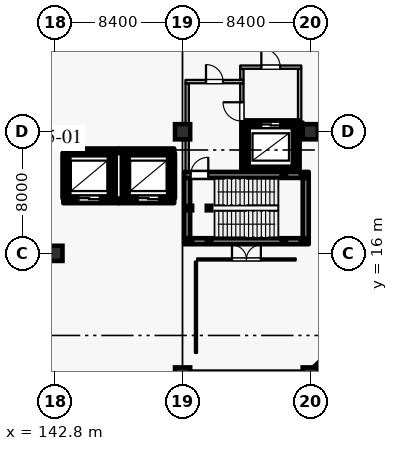
"""IFC4 building model, lengths in metres.
Left out: names, types, materials, properties, quantities, classifications, styles, units other than length and angle.
Written with IfcOpenShell. Run it as: python <this file> out.ifc"""

import sys

from ifc_helpers import new_model, si_unit, direction, frame, frame_2d, origin, origin_2d, place, context, subcontext, project, spatial, rectangle, hollow_rectangle, extrude, element, fill, save


model = new_model("IFC4")
c1 = context("Model", 3, precision=1e-05, world=origin(), true_north=direction((0.0, 1.0)))
c2 = subcontext(c1, "Body", "Model", "MODEL_VIEW")
j1 = project(units=[si_unit("LENGTHUNIT", "METRE"), si_unit("PLANEANGLEUNIT", "RADIAN")], contexts=[c1])
p1 = place(None, origin())
s1 = spatial("IfcSite", under=j1, at=p1, CompositionType="ELEMENT")
p2 = place(p1, origin())
s2 = spatial("IfcBuilding", under=s1, at=p2, CompositionType="ELEMENT")
p3 = place(p2, frame((0.0, 0.0, -5.4)))
s3 = spatial("IfcBuildingStorey", under=s2, at=p3, CompositionType="ELEMENT", Elevation=-5.4)
for number, where, z_axis, x_axis in (
    (1, (142.8, 16.0, 0.0), (0.0, 0.0, 1.0), (1.0, 0.0, 0.0)),
    (2, (151.2, 8.0, 0.0), (0.0, 0.0, 1.0), (1.0, 0.0, 0.0)),
    (3, (151.2, 24.0, 0.0), (0.0, 0.0, 1.0), (1.0, 0.0, 0.0)),
    (4, (159.6, 8.0, 0.0), (0.0, 0.0, 1.0), (1.0, 0.0, 0.0)),
    (5, (159.6, 24.0, 0.0), (0.0, 0.0, 1.0), (1.0, 0.0, 0.0)),
):
    element("IfcColumn", number, at=place(p3, frame(where, z_axis=z_axis, x_axis=x_axis)), inside=s3, PredefinedType="COLUMN", context=c2, shape_type="SweptSolid", body=[
        extrude(rectangle(XDim=1.0, YDim=1.0, at=origin_2d()), origin(), (0.0, 0.0, 1.0), 5.4),
    ])
p4 = place(p3, frame((155.15, 21.4, -1.4), z_axis=(0.0, 0.0, 1.0), x_axis=(1.0, 0.0, 0.0)))
e6 = element("IfcWall", 6, at=p4, inside=s3, PredefinedType="USERDEFINED", context=c2, shape_type="SweptSolid", body=[
    extrude(rectangle(XDim=3.7, YDim=0.3, at=frame_2d((1.85, 0.0))), origin(), (0.0, 0.0, 1.0), 1.4),
])
p5 = place(p3, frame((158.75, 21.56, -1.4), z_axis=(0.0, 0.0, 1.0), x_axis=(0.0, 1.0, 0.0)))
e7 = element("IfcWall", 7, at=p5, inside=s3, PredefinedType="USERDEFINED", context=c2, shape_type="SweptSolid", body=[
    extrude(rectangle(XDim=2.88, YDim=0.3, at=frame_2d((1.44, 0.0))), origin(), (0.0, 0.0, 1.0), 1.4),
])
p6 = place(p3, frame((158.85, 24.6, -1.4), z_axis=(0.0, 0.0, 1.0), x_axis=(-1.0, 0.0, 0.0)))
e8 = element("IfcWall", 8, at=p6, inside=s3, PredefinedType="USERDEFINED", context=c2, shape_type="SweptSolid", body=[
    extrude(rectangle(XDim=3.7, YDim=0.3, at=frame_2d((1.85, 0.0))), origin(), (0.0, 0.0, 1.0), 1.4),
])
p7 = place(p3, frame((155.25, 24.44, -1.4), z_axis=(0.0, 0.0, 1.0), x_axis=(0.0, -1.0, 0.0)))
e9 = element("IfcWall", 9, at=p7, inside=s3, PredefinedType="USERDEFINED", context=c2, shape_type="SweptSolid", body=[
    extrude(rectangle(XDim=2.88, YDim=0.3, at=frame_2d((1.44, 0.0))), origin(), (0.0, 0.0, 1.0), 1.4),
])
p8 = place(p3, frame((143.35, 19.45, -1.4), z_axis=(0.0, 0.0, 1.0), x_axis=(1.0, 0.0, 0.0)))
e10 = element("IfcWall", 10, at=p8, inside=s3, PredefinedType="USERDEFINED", context=c2, shape_type="SweptSolid", body=[
    extrude(rectangle(XDim=3.65, YDim=0.3, at=frame_2d((1.825, 0.0))), origin(), (0.0, 0.0, 1.0), 1.4),
])
p9 = place(p3, frame((146.65, 19.61, -1.4), z_axis=(0.0, 0.0, 1.0), x_axis=(0.0, 1.0, 0.0)))
e11 = element("IfcWall", 11, at=p9, inside=s3, PredefinedType="USERDEFINED", context=c2, shape_type="SweptSolid", body=[
    extrude(rectangle(XDim=2.98, YDim=0.3, at=frame_2d((1.49, 0.0))), origin(), (0.0, 0.0, 1.0), 1.4),
])
p10 = place(p3, frame((147.0, 22.75, -1.4), z_axis=(0.0, 0.0, 1.0), x_axis=(-1.0, 0.0, 0.0)))
e12 = element("IfcWall", 12, at=p10, inside=s3, PredefinedType="USERDEFINED", context=c2, shape_type="SweptSolid", body=[
    extrude(rectangle(XDim=3.65, YDim=0.3, at=frame_2d((1.825, 0.0))), origin(), (0.0, 0.0, 1.0), 1.4),
])
p11 = place(p3, frame((143.45, 22.59, -1.4), z_axis=(0.0, 0.0, 1.0), x_axis=(0.0, -1.0, 0.0)))
e13 = element("IfcWall", 13, at=p11, inside=s3, PredefinedType="USERDEFINED", context=c2, shape_type="SweptSolid", body=[
    extrude(rectangle(XDim=2.98, YDim=0.3, at=frame_2d((1.49, 0.0))), origin(), (0.0, 0.0, 1.0), 1.4),
])
p12 = place(p3, frame((147.0, 19.45, -1.4), z_axis=(0.0, 0.0, 1.0), x_axis=(1.0, 0.0, 0.0)))
e14 = element("IfcWall", 14, at=p12, inside=s3, PredefinedType="USERDEFINED", context=c2, shape_type="SweptSolid", body=[
    extrude(rectangle(XDim=3.65, YDim=0.3, at=frame_2d((1.825, 0.0))), origin(), (0.0, 0.0, 1.0), 1.4),
])
p13 = place(p3, frame((150.55, 19.61, -1.4), z_axis=(0.0, 0.0, 1.0), x_axis=(0.0, 1.0, 0.0)))
e15 = element("IfcWall", 15, at=p13, inside=s3, PredefinedType="USERDEFINED", context=c2, shape_type="SweptSolid", body=[
    extrude(rectangle(XDim=2.98, YDim=0.3, at=frame_2d((1.49, 0.0))), origin(), (0.0, 0.0, 1.0), 1.4),
])
p14 = place(p3, frame((150.65, 22.75, -1.4), z_axis=(0.0, 0.0, 1.0), x_axis=(-1.0, 0.0, 0.0)))
e16 = element("IfcWall", 16, at=p14, inside=s3, PredefinedType="USERDEFINED", context=c2, shape_type="SweptSolid", body=[
    extrude(rectangle(XDim=3.65, YDim=0.3, at=frame_2d((1.825, 0.0))), origin(), (0.0, 0.0, 1.0), 1.4),
])
p15 = place(p3, frame((147.35, 22.59, -1.4), z_axis=(0.0, 0.0, 1.0), x_axis=(0.0, -1.0, 0.0)))
e17 = element("IfcWall", 17, at=p15, inside=s3, PredefinedType="USERDEFINED", context=c2, shape_type="SweptSolid", body=[
    extrude(rectangle(XDim=2.98, YDim=0.3, at=frame_2d((1.49, 0.0))), origin(), (0.0, 0.0, 1.0), 1.4),
])
p16 = place(p3, frame((159.1, 8.0, 0.0), z_axis=(0.0, 0.0, 1.0), x_axis=(-1.0, 0.0, 0.0)))
e18 = element("IfcWall", 18, at=p16, inside=s3, PredefinedType="USERDEFINED", context=c2, shape_type="SweptSolid", body=[
    extrude(rectangle(XDim=7.4, YDim=0.45, at=frame_2d((3.7, 0.0))), origin(), (0.0, 0.0, 1.0), 4.3),
])
p17 = place(p3, frame((167.638, 15.655, 0.0), z_axis=(0.0, 0.0, 1.0), x_axis=(-0.72415874468, -0.689633317426, 0.0)))
e19 = element("IfcWall", 19, at=p17, inside=s3, PredefinedType="USERDEFINED", context=c2, shape_type="SweptSolid", body=[
    extrude(rectangle(XDim=10.6, YDim=0.45, at=frame_2d((5.3, 0.0))), origin(), (0.0, 0.0, 1.0), 4.3),
])
p18 = place(p3, frame((155.25, 21.55, 0.0), z_axis=(0.0, 0.0, 1.0), x_axis=(1.0, 0.0, 0.0)))
e20 = element("IfcWall", 20, at=p18, inside=s3, PredefinedType="SHEAR", context=c2, shape_type="SweptSolid", body=[
    extrude(rectangle(XDim=3.5, YDim=0.3, at=frame_2d((1.75, 0.0))), origin(), (0.0, 0.0, 1.0), 4.995),
])
p19 = place(p3, frame((158.6, 21.705, 0.0), z_axis=(0.0, 0.0, 1.0), x_axis=(0.0, 1.0, 0.0)))
e21 = element("IfcWall", 21, at=p19, inside=s3, PredefinedType="SHEAR", context=c2, shape_type="SweptSolid", body=[
    extrude(rectangle(XDim=2.59, YDim=0.3, at=frame_2d((1.295, 0.0))), origin(), (0.0, 0.0, 1.0), 4.995),
])
p20 = place(p3, frame((159.11, 24.45, 0.0), z_axis=(0.0, 0.0, 1.0), x_axis=(-1.0, 0.0, 0.0)))
e22 = element("IfcWall", 22, at=p20, inside=s3, PredefinedType="SHEAR", context=c2, shape_type="SweptSolid", body=[
    extrude(rectangle(XDim=3.86, YDim=0.3, at=frame_2d((1.93, 0.0))), origin(), (0.0, 0.0, 1.0), 4.995),
])
p21 = place(p20, frame((1.485, 0.0, 0.0)))
e23 = element("IfcOpeningElement", 23, at=p21, cuts=e22, PredefinedType="OPENING", context=c2, shape_type="SweptSolid", body=[
    extrude(rectangle(XDim=1.25, YDim=2.25, at=frame_2d((0.625, 1.125))), frame((0.0, 0.16, 0.0), z_axis=(0.0, -1.0, 0.0), x_axis=(1.0, 0.0, 0.0)), (0.0, 0.0, 1.0), 0.32),
])
p22 = place(p3, frame((155.4, 24.295, 0.0), z_axis=(0.0, 0.0, 1.0), x_axis=(0.0, -1.0, 0.0)))
e24 = element("IfcWall", 24, at=p22, inside=s3, PredefinedType="SHEAR", context=c2, shape_type="SweptSolid", body=[
    extrude(rectangle(XDim=2.59, YDim=0.3, at=frame_2d((1.295, 0.0))), origin(), (0.0, 0.0, 1.0), 4.995),
])
p23 = place(p3, frame((143.45, 19.6, 0.0), z_axis=(0.0, 0.0, 1.0), x_axis=(1.0, 0.0, 0.0)))
e25 = element("IfcWall", 25, at=p23, inside=s3, PredefinedType="SHEAR", context=c2, shape_type="SweptSolid", body=[
    extrude(rectangle(XDim=3.2, YDim=0.3, at=frame_2d((1.6, 0.0))), origin(), (0.0, 0.0, 1.0), 4.995),
])
p24 = place(p23, frame((0.9, 0.0, 0.0)))
e26 = element("IfcOpeningElement", 26, at=p24, cuts=e25, PredefinedType="OPENING", context=c2, shape_type="SweptSolid", body=[
    extrude(rectangle(XDim=1.4, YDim=2.35, at=frame_2d((0.7, 1.175))), frame((0.0, 0.16, 0.0), z_axis=(0.0, -1.0, 0.0), x_axis=(1.0, 0.0, 0.0)), (0.0, 0.0, 1.0), 0.32),
])
p25 = place(p3, frame((146.5, 19.755, 0.0), z_axis=(0.0, 0.0, 1.0), x_axis=(0.0, 1.0, 0.0)))
e27 = element("IfcWall", 27, at=p25, inside=s3, PredefinedType="SHEAR", context=c2, shape_type="SweptSolid", body=[
    extrude(rectangle(XDim=2.69, YDim=0.3, at=frame_2d((1.345, 0.0))), origin(), (0.0, 0.0, 1.0), 4.995),
])
p26 = place(p3, frame((146.65, 22.6, 0.0), z_axis=(0.0, 0.0, 1.0), x_axis=(-1.0, 0.0, 0.0)))
e28 = element("IfcWall", 28, at=p26, inside=s3, PredefinedType="SHEAR", context=c2, shape_type="SweptSolid", body=[
    extrude(rectangle(XDim=3.2, YDim=0.3, at=frame_2d((1.6, 0.0))), origin(), (0.0, 0.0, 1.0), 4.995),
])
p27 = place(p3, frame((143.6, 22.445, 0.0), z_axis=(0.0, 0.0, 1.0), x_axis=(0.0, -1.0, 0.0)))
e29 = element("IfcWall", 29, at=p27, inside=s3, PredefinedType="SHEAR", context=c2, shape_type="SweptSolid", body=[
    extrude(rectangle(XDim=2.69, YDim=0.3, at=frame_2d((1.345, 0.0))), origin(), (0.0, 0.0, 1.0), 4.995),
])
p28 = place(p3, frame((147.35, 19.6, 0.0), z_axis=(0.0, 0.0, 1.0), x_axis=(1.0, 0.0, 0.0)))
e30 = element("IfcWall", 30, at=p28, inside=s3, PredefinedType="SHEAR", context=c2, shape_type="SweptSolid", body=[
    extrude(rectangle(XDim=3.2, YDim=0.3, at=frame_2d((1.6, 0.0))), origin(), (0.0, 0.0, 1.0), 4.995),
])
p29 = place(p28, frame((0.9, 0.0, 0.0)))
e31 = element("IfcOpeningElement", 31, at=p29, cuts=e30, PredefinedType="OPENING", context=c2, shape_type="SweptSolid", body=[
    extrude(rectangle(XDim=1.4, YDim=2.35, at=frame_2d((0.7, 1.175))), frame((0.0, 0.16, 0.0), z_axis=(0.0, -1.0, 0.0), x_axis=(1.0, 0.0, 0.0)), (0.0, 0.0, 1.0), 0.32),
])
p30 = place(p3, frame((150.4, 19.755, 0.0), z_axis=(0.0, 0.0, 1.0), x_axis=(0.0, 1.0, 0.0)))
e32 = element("IfcWall", 32, at=p30, inside=s3, PredefinedType="SHEAR", context=c2, shape_type="SweptSolid", body=[
    extrude(rectangle(XDim=2.69, YDim=0.3, at=frame_2d((1.345, 0.0))), origin(), (0.0, 0.0, 1.0), 4.995),
])
p31 = place(p3, frame((150.55, 22.6, 0.0), z_axis=(0.0, 0.0, 1.0), x_axis=(-1.0, 0.0, 0.0)))
e33 = element("IfcWall", 33, at=p31, inside=s3, PredefinedType="SHEAR", context=c2, shape_type="SweptSolid", body=[
    extrude(rectangle(XDim=3.2, YDim=0.3, at=frame_2d((1.6, 0.0))), origin(), (0.0, 0.0, 1.0), 4.995),
])
p32 = place(p3, frame((147.5, 22.445, 0.0), z_axis=(0.0, 0.0, 1.0), x_axis=(0.0, -1.0, 0.0)))
e34 = element("IfcWall", 34, at=p32, inside=s3, PredefinedType="SHEAR", context=c2, shape_type="SweptSolid", body=[
    extrude(rectangle(XDim=2.69, YDim=0.3, at=frame_2d((1.345, 0.0))), origin(), (0.0, 0.0, 1.0), 4.995),
])
p33 = place(p3, frame((151.3, 16.8, 0.0), z_axis=(0.0, 0.0, 1.0), x_axis=(1.0, 0.0, 0.0)))
e35 = element("IfcWall", 35, at=p33, inside=s3, PredefinedType="SHEAR", context=c2, shape_type="SweptSolid", body=[
    extrude(rectangle(XDim=8.2, YDim=0.4, at=frame_2d((4.1, 0.0))), origin(), (0.0, 0.0, 1.0), 4.995),
])
p34 = place(p3, frame((159.3, 17.005, 0.0), z_axis=(0.0, 0.0, 1.0), x_axis=(0.0, 1.0, 0.0)))
e36 = element("IfcWall", 36, at=p34, inside=s3, PredefinedType="SHEAR", context=c2, shape_type="SweptSolid", body=[
    extrude(rectangle(XDim=3.95, YDim=0.4, at=frame_2d((1.975, 0.0))), origin(), (0.0, 0.0, 1.0), 4.995),
])
p35 = place(p3, frame((151.3, 21.16, 0.0), z_axis=(0.0, 0.0, 1.0), x_axis=(1.0, 0.0, 0.0)))
e37 = element("IfcWall", 37, at=p35, inside=s3, PredefinedType="SHEAR", context=c2, shape_type="SweptSolid", body=[
    extrude(rectangle(XDim=8.2, YDim=0.4, at=frame_2d((4.1, 0.0))), origin(), (0.0, 0.0, 1.0), 4.995),
])
p36 = place(p35, frame((0.43, 0.0, 0.0)))
e38 = element("IfcOpeningElement", 38, at=p36, cuts=e37, PredefinedType="OPENING", context=c2, shape_type="SweptSolid", body=[
    extrude(rectangle(XDim=1.16, YDim=2.2, at=frame_2d((0.58, 1.1))), frame((0.0, 0.21, 0.0), z_axis=(0.0, -1.0, 0.0), x_axis=(1.0, 0.0, 0.0)), (0.0, 0.0, 1.0), 0.42),
])
p37 = place(p3, frame((151.5, 17.005, 0.0), z_axis=(0.0, 0.0, 1.0), x_axis=(0.0, 1.0, 0.0)))
e39 = element("IfcWall", 39, at=p37, inside=s3, PredefinedType="SHEAR", context=c2, shape_type="SweptSolid", body=[
    extrude(rectangle(XDim=3.95, YDim=0.4, at=frame_2d((1.975, 0.0))), origin(), (0.0, 0.0, 1.0), 4.995),
])
p38 = place(p3, frame((151.5, 21.365, 0.0), z_axis=(0.0, 0.0, 1.0), x_axis=(0.0, 1.0, 0.0)))
e40 = element("IfcWall", 40, at=p38, inside=s3, PredefinedType="PARTITIONING", context=c2, shape_type="SweptSolid", body=[
    extrude(rectangle(XDim=5.82, YDim=0.22, at=frame_2d((2.91, 0.0))), origin(), (0.0, 0.0, 1.0), 4.05),
])
p39 = place(p3, frame((151.39, 27.3, 0.0), z_axis=(0.0, 0.0, 1.0), x_axis=(1.0, 0.0, 0.0)))
e41 = element("IfcWall", 41, at=p39, inside=s3, PredefinedType="PARTITIONING", context=c2, shape_type="SweptSolid", body=[
    extrude(rectangle(XDim=3.82, YDim=0.22, at=frame_2d((1.91, 0.0))), origin(), (0.0, 0.0, 1.0), 4.995),
])
p40 = place(p39, frame((1.35, 0.0, 0.0)))
e42 = element("IfcOpeningElement", 42, at=p40, cuts=e41, PredefinedType="OPENING", context=c2, shape_type="SweptSolid", body=[
    extrude(rectangle(XDim=1.12, YDim=2.2, at=frame_2d((0.56, 1.1))), frame((0.0, 0.12, 0.0), z_axis=(0.0, -1.0, 0.0), x_axis=(1.0, 0.0, 0.0)), (0.0, 0.0, 1.0), 0.24),
])
p41 = place(p3, frame((155.1, 21.365, 0.0), z_axis=(0.0, 0.0, 1.0), x_axis=(0.0, 1.0, 0.0)))
e43 = element("IfcWall", 43, at=p41, inside=s3, PredefinedType="PARTITIONING", context=c2, shape_type="SweptSolid", body=[
    extrude(rectangle(XDim=5.82, YDim=0.22, at=frame_2d((2.91, 0.0))), origin(), (0.0, 0.0, 1.0), 4.995),
])
p42 = place(p41, frame((3.335, 0.0, 0.0)))
e44 = element("IfcOpeningElement", 44, at=p42, cuts=e43, PredefinedType="OPENING", context=c2, shape_type="SweptSolid", body=[
    extrude(rectangle(XDim=1.24, YDim=2.2, at=frame_2d((0.62, 1.1))), frame((0.0, 0.12, 0.0), z_axis=(0.0, -1.0, 0.0), x_axis=(1.0, 0.0, 0.0)), (0.0, 0.0, 1.0), 0.24),
])
p43 = place(p3, frame((155.1, 27.415, 0.0), z_axis=(0.0, 0.0, 1.0), x_axis=(0.0, 1.0, 0.0)))
e45 = element("IfcWall", 45, at=p43, inside=s3, PredefinedType="PARTITIONING", context=c2, shape_type="SweptSolid", body=[
    extrude(rectangle(XDim=0.72, YDim=0.22, at=frame_2d((0.36, 0.0))), origin(), (0.0, 0.0, 1.0), 4.995),
])
p44 = place(p3, frame((158.9, 24.605, 0.0), z_axis=(0.0, 0.0, 1.0), x_axis=(0.0, 1.0, 0.0)))
e46 = element("IfcWall", 46, at=p44, inside=s3, PredefinedType="PARTITIONING", context=c2, shape_type="SweptSolid", body=[
    extrude(rectangle(XDim=3.53, YDim=0.22, at=frame_2d((1.765, 0.0))), origin(), (0.0, 0.0, 1.0), 4.995),
])
p45 = place(p3, frame((154.99, 28.25, 0.0), z_axis=(0.0, 0.0, 1.0), x_axis=(1.0, 0.0, 0.0)))
e47 = element("IfcWall", 47, at=p45, inside=s3, PredefinedType="PARTITIONING", context=c2, shape_type="SweptSolid", body=[
    extrude(rectangle(XDim=4.02, YDim=0.22, at=frame_2d((2.01, 0.0))), origin(), (0.0, 0.0, 1.0), 4.995),
])
p46 = place(p45, frame((1.39, 0.0, 0.0)))
e48 = element("IfcOpeningElement", 48, at=p46, cuts=e47, PredefinedType="OPENING", context=c2, shape_type="SweptSolid", body=[
    extrude(rectangle(XDim=1.24, YDim=2.2, at=frame_2d((0.62, 1.1))), frame((0.0, 0.12, 0.0), z_axis=(0.0, -1.0, 0.0), x_axis=(1.0, 0.0, 0.0)), (0.0, 0.0, 1.0), 0.24),
])
for number, where, z_axis, x_axis in (
    (49, (151.68, 16.8, 0.0), (0.0, 0.0, 1.0), (1.0, 0.0, 0.0)),
    (50, (151.68, 18.98, 0.0), (0.0, 0.0, 1.0), (1.0, 0.0, 0.0)),
    (51, (152.94, 16.8, 0.0), (0.0, 0.0, 1.0), (1.0, 0.0, 0.0)),
    (52, (152.94, 18.98, 0.0), (0.0, 0.0, 1.0), (1.0, 0.0, 0.0)),
):
    element("IfcColumn", number, at=place(p3, frame(where, z_axis=z_axis, x_axis=x_axis)), inside=s3, PredefinedType="COLUMN", context=c2, shape_type="SweptSolid", body=[
        extrude(hollow_rectangle(XDim=0.3, YDim=0.3, WallThickness=0.012, at=origin_2d()), origin(), (0.0, 0.0, 1.0), 5.22),
    ])
for number, where, z_axis, x_axis in (
    (53, (157.86, 16.8, 0.0), (0.0, 0.0, 1.0), (1.0, 0.0, 0.0)),
    (54, (157.86, 21.16, 0.0), (0.0, 0.0, 1.0), (1.0, 0.0, 0.0)),
    (55, (159.12, 16.8, 0.0), (0.0, 0.0, 1.0), (1.0, 0.0, 0.0)),
    (56, (159.12, 21.16, 0.0), (0.0, 0.0, 1.0), (1.0, 0.0, 0.0)),
):
    element("IfcColumn", number, at=place(p3, frame(where, z_axis=z_axis, x_axis=x_axis)), inside=s3, PredefinedType="COLUMN", context=c2, shape_type="SweptSolid", body=[
        extrude(hollow_rectangle(XDim=0.3, YDim=0.3, WallThickness=0.012, at=origin_2d()), origin(), (0.0, 0.0, 1.0), 2.52),
    ])
p47 = place(p3, frame((152.16, 15.6, 0.0), z_axis=(0.0, 0.0, 1.0), x_axis=(1.0, 0.0, 0.0)))
e57 = element("IfcWall", 57, at=p47, inside=s3, PredefinedType="PARTITIONING", context=c2, shape_type="SweptSolid", body=[
    extrude(rectangle(XDim=6.48, YDim=0.14, at=frame_2d((3.24, 0.0))), origin(), (0.0, 0.0, 1.0), 4.995),
])
p48 = place(p47, frame((2.29, 0.0, 0.0)))
e58 = element("IfcOpeningElement", 58, at=p48, cuts=e57, PredefinedType="OPENING", context=c2, shape_type="SweptSolid", body=[
    extrude(rectangle(XDim=1.9, YDim=2.4, at=frame_2d((0.95, 1.2))), frame((0.0, 0.08, 0.0), z_axis=(0.0, -1.0, 0.0), x_axis=(1.0, 0.0, 0.0)), (0.0, 0.0, 1.0), 0.16),
])
p49 = place(p3, frame((152.08, 9.45, 0.0), z_axis=(0.0, 0.0, 1.0), x_axis=(0.0, 1.0, 0.0)))
e59 = element("IfcWall", 59, at=p49, inside=s3, PredefinedType="PARTITIONING", context=c2, shape_type="SweptSolid", body=[
    extrude(rectangle(XDim=6.01, YDim=0.14, at=frame_2d((3.005, 0.0))), origin(), (0.0, 0.0, 1.0), 4.995),
])
p50 = place(p21, origin())
e60 = element("IfcDoor", 60, at=p50, inside=s3, OperationType="DOUBLE_DOOR_SLIDING", PredefinedType="DOOR", context=c2, shape_type="SweptSolid", body=[
    extrude(rectangle(XDim=1.25, YDim=2.25, at=frame_2d((0.625, 1.125))), frame((0.0, 0.025, 0.0), z_axis=(0.0, -1.0, 0.0), x_axis=(1.0, 0.0, 0.0)), (0.0, 0.0, 1.0), 0.05),
])
fill(e23, e60)
p51 = place(p24, origin())
e61 = element("IfcDoor", 61, at=p51, inside=s3, OperationType="DOUBLE_DOOR_SLIDING", PredefinedType="DOOR", context=c2, shape_type="SweptSolid", body=[
    extrude(rectangle(XDim=1.4, YDim=2.35, at=frame_2d((0.7, 1.175))), frame((0.0, 0.025, 0.0), z_axis=(0.0, -1.0, 0.0), x_axis=(1.0, 0.0, 0.0)), (0.0, 0.0, 1.0), 0.05),
])
fill(e26, e61)
p52 = place(p29, origin())
e62 = element("IfcDoor", 62, at=p52, inside=s3, OperationType="DOUBLE_DOOR_SLIDING", PredefinedType="DOOR", context=c2, shape_type="SweptSolid", body=[
    extrude(rectangle(XDim=1.4, YDim=2.35, at=frame_2d((0.7, 1.175))), frame((0.0, 0.025, 0.0), z_axis=(0.0, -1.0, 0.0), x_axis=(1.0, 0.0, 0.0)), (0.0, 0.0, 1.0), 0.05),
])
fill(e31, e62)
p53 = place(p36, origin())
e63 = element("IfcDoor", 63, at=p53, inside=s3, OperationType="SINGLE_SWING_RIGHT", PredefinedType="DOOR", context=c2, shape_type="SweptSolid", body=[
    extrude(rectangle(XDim=1.16, YDim=2.2, at=frame_2d((0.58, 1.1))), frame((0.0, 0.025, 0.0), z_axis=(0.0, -1.0, 0.0), x_axis=(1.0, 0.0, 0.0)), (0.0, 0.0, 1.0), 0.05),
])
fill(e38, e63)
p54 = place(p40, origin())
e64 = element("IfcDoor", 64, at=p54, inside=s3, OperationType="SINGLE_SWING_LEFT", PredefinedType="DOOR", context=c2, shape_type="SweptSolid", body=[
    extrude(rectangle(XDim=1.12, YDim=2.2, at=frame_2d((0.56, 1.1))), frame((0.0, 0.025, 0.0), z_axis=(0.0, -1.0, 0.0), x_axis=(1.0, 0.0, 0.0)), (0.0, 0.0, 1.0), 0.05),
])
fill(e42, e64)
p55 = place(p42, origin())
e65 = element("IfcDoor", 65, at=p55, inside=s3, OperationType="SINGLE_SWING_RIGHT", PredefinedType="DOOR", context=c2, shape_type="SweptSolid", body=[
    extrude(rectangle(XDim=1.24, YDim=2.2, at=frame_2d((0.62, 1.1))), frame((0.0, 0.025, 0.0), z_axis=(0.0, -1.0, 0.0), x_axis=(1.0, 0.0, 0.0)), (0.0, 0.0, 1.0), 0.05),
])
fill(e44, e65)
p56 = place(p46, origin())
e66 = element("IfcDoor", 66, at=p56, inside=s3, OperationType="SINGLE_SWING_LEFT", PredefinedType="DOOR", context=c2, shape_type="SweptSolid", body=[
    extrude(rectangle(XDim=1.24, YDim=2.2, at=frame_2d((0.62, 1.1))), frame((0.0, 0.025, 0.0), z_axis=(0.0, -1.0, 0.0), x_axis=(1.0, 0.0, 0.0)), (0.0, 0.0, 1.0), 0.05),
])
fill(e48, e66)
p57 = place(p48, origin())
e67 = element("IfcDoor", 67, at=p57, inside=s3, OperationType="DOUBLE_DOOR_SINGLE_SWING", PredefinedType="DOOR", context=c2, shape_type="SweptSolid", body=[
    extrude(rectangle(XDim=1.9, YDim=2.4, at=frame_2d((0.95, 1.2))), frame((0.0, 0.025, 0.0), z_axis=(0.0, -1.0, 0.0), x_axis=(1.0, 0.0, 0.0)), (0.0, 0.0, 1.0), 0.05),
])
fill(e58, e67)
save(model, sys.argv[1])
